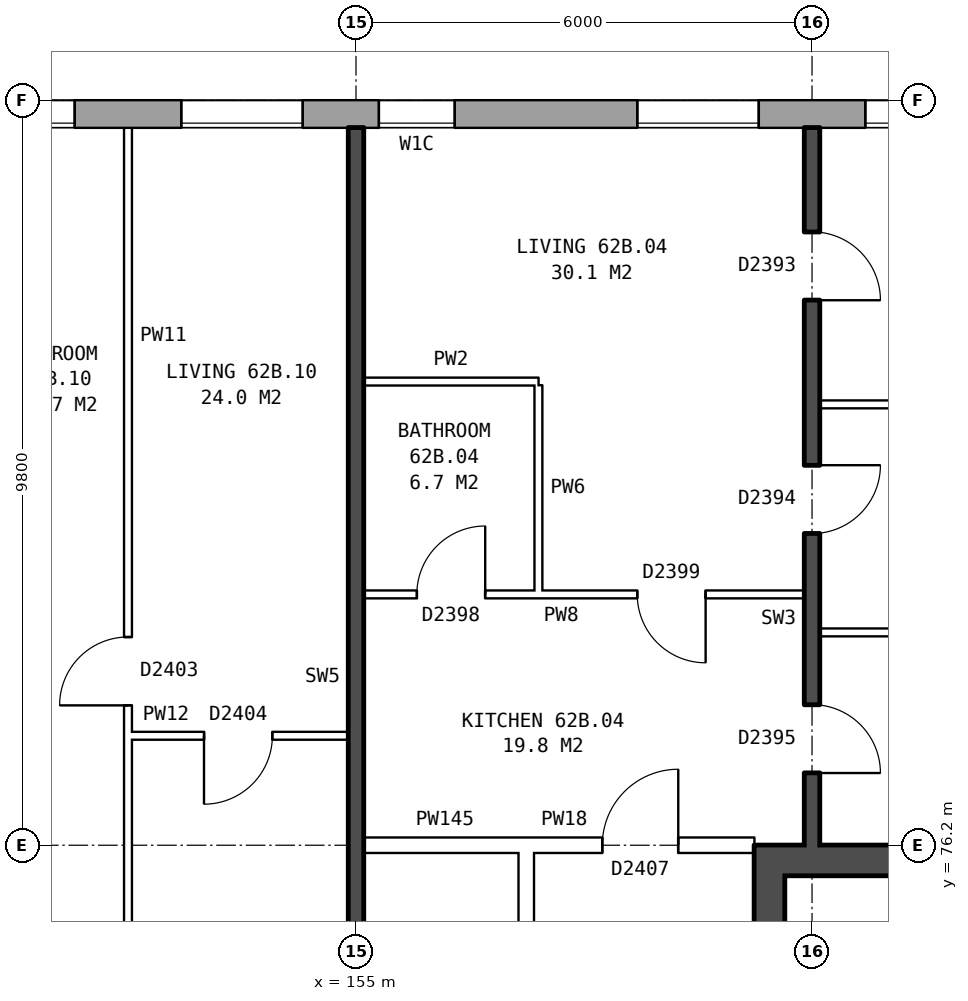
"""IFC4 building model, lengths in metres.
Left out: names, types, materials, properties, quantities, classifications, styles, units other than length and angle.
Written with IfcOpenShell. Run it as: python <this file> out.ifc"""

import sys

from ifc_helpers import new_model, si_unit, direction, frame, frame_2d, origin, place, context, subcontext, project, spatial, rectangle, extrude, element, fill, save


model = new_model("IFC4")
c1 = context("Model", 3, precision=1e-05, world=origin(), true_north=direction((0.0, 1.0)))
c2 = subcontext(c1, "Body", "Model", "MODEL_VIEW")
j1 = project(units=[si_unit("LENGTHUNIT", "METRE"), si_unit("PLANEANGLEUNIT", "RADIAN")], contexts=[c1])
p1 = place(None, origin())
s1 = spatial("IfcSite", under=j1, at=p1, CompositionType="ELEMENT")
p2 = place(p1, origin())
s2 = spatial("IfcBuilding", under=s1, at=p2, CompositionType="ELEMENT")
p3 = place(p2, frame((0.0, 0.0, 221.4)))
s3 = spatial("IfcBuildingStorey", under=s2, at=p3, CompositionType="ELEMENT", Elevation=221.4)
p4 = place(p3, frame((165.925, 85.82, 0.0), z_axis=(0.0, 0.0, 1.0), x_axis=(-1.0, 0.0, 0.0)))
e1 = element("IfcWall", 1, at=p4, inside=s3, PredefinedType="STANDARD", context=c2, shape_type="SweptSolid", body=[
    extrude(rectangle(XDim=33.875, YDim=0.36, at=frame_2d((16.938, 0.0))), origin(), (0.0, 0.0, 1.0), 2.85),
])
p5 = place(p4, frame((2.625, 0.0, 0.8)))
e2 = element("IfcOpeningElement", 2, at=p5, cuts=e1, PredefinedType="OPENING", context=c2, shape_type="SweptSolid", body=[
    extrude(rectangle(XDim=1.6, YDim=1.8, at=frame_2d((0.8, 0.9))), frame((0.0, 0.19, 0.0), z_axis=(0.0, -1.0, 0.0), x_axis=(1.0, 0.0, 0.0)), (0.0, 0.0, 1.0), 0.38),
])
p6 = place(p4, frame((5.625, 0.0, 0.8)))
e3 = element("IfcOpeningElement", 3, at=p6, cuts=e1, PredefinedType="OPENING", context=c2, shape_type="SweptSolid", body=[
    extrude(rectangle(XDim=1.6, YDim=1.8, at=frame_2d((0.8, 0.9))), frame((0.0, 0.19, 0.0), z_axis=(0.0, -1.0, 0.0), x_axis=(1.0, 0.0, 0.0)), (0.0, 0.0, 1.0), 0.38),
])
p7 = place(p4, frame((9.625, 0.0, 0.8)))
e4 = element("IfcOpeningElement", 4, at=p7, cuts=e1, PredefinedType="OPENING", context=c2, shape_type="SweptSolid", body=[
    extrude(rectangle(XDim=1.0, YDim=1.8, at=frame_2d((0.5, 0.9))), frame((0.0, 0.19, 0.0), z_axis=(0.0, -1.0, 0.0), x_axis=(1.0, 0.0, 0.0)), (0.0, 0.0, 1.0), 0.38),
])
p8 = place(p4, frame((11.625, 0.0, 0.8)))
e5 = element("IfcOpeningElement", 5, at=p8, cuts=e1, PredefinedType="OPENING", context=c2, shape_type="SweptSolid", body=[
    extrude(rectangle(XDim=1.6, YDim=1.8, at=frame_2d((0.8, 0.9))), frame((0.0, 0.19, 0.0), z_axis=(0.0, -1.0, 0.0), x_axis=(1.0, 0.0, 0.0)), (0.0, 0.0, 1.0), 0.38),
])
p9 = place(p4, frame((14.625, 0.0, 0.8)))
e6 = element("IfcOpeningElement", 6, at=p9, cuts=e1, PredefinedType="OPENING", context=c2, shape_type="SweptSolid", body=[
    extrude(rectangle(XDim=1.6, YDim=1.8, at=frame_2d((0.8, 0.9))), frame((0.0, 0.19, 0.0), z_axis=(0.0, -1.0, 0.0), x_axis=(1.0, 0.0, 0.0)), (0.0, 0.0, 1.0), 0.38),
])
p10 = place(p4, frame((17.625, 0.0, 0.8)))
e7 = element("IfcOpeningElement", 7, at=p10, cuts=e1, PredefinedType="OPENING", context=c2, shape_type="SweptSolid", body=[
    extrude(rectangle(XDim=1.6, YDim=1.8, at=frame_2d((0.8, 0.9))), frame((0.0, 0.19, 0.0), z_axis=(0.0, -1.0, 0.0), x_axis=(1.0, 0.0, 0.0)), (0.0, 0.0, 1.0), 0.38),
])
p11 = place(p4, frame((20.625, 0.0, 0.8)))
e8 = element("IfcOpeningElement", 8, at=p11, cuts=e1, PredefinedType="OPENING", context=c2, shape_type="SweptSolid", body=[
    extrude(rectangle(XDim=1.6, YDim=1.8, at=frame_2d((0.8, 0.9))), frame((0.0, 0.19, 0.0), z_axis=(0.0, -1.0, 0.0), x_axis=(1.0, 0.0, 0.0)), (0.0, 0.0, 1.0), 0.38),
])
p12 = place(p4, frame((23.825, 0.0, 1.7)))
e9 = element("IfcOpeningElement", 9, at=p12, cuts=e1, PredefinedType="OPENING", context=c2, shape_type="SweptSolid", body=[
    extrude(rectangle(XDim=0.6, YDim=0.9, at=frame_2d((0.3, 0.45))), frame((0.0, 0.19, 0.0), z_axis=(0.0, -1.0, 0.0), x_axis=(1.0, 0.0, 0.0)), (0.0, 0.0, 1.0), 0.38),
])
p13 = place(p4, frame((26.625, 0.0, 0.8)))
e10 = element("IfcOpeningElement", 10, at=p13, cuts=e1, PredefinedType="OPENING", context=c2, shape_type="SweptSolid", body=[
    extrude(rectangle(XDim=1.6, YDim=1.8, at=frame_2d((0.8, 0.9))), frame((0.0, 0.19, 0.0), z_axis=(0.0, -1.0, 0.0), x_axis=(1.0, 0.0, 0.0)), (0.0, 0.0, 1.0), 0.38),
])
p14 = place(p4, frame((29.625, 0.0, 0.8)))
e11 = element("IfcOpeningElement", 11, at=p14, cuts=e1, PredefinedType="OPENING", context=c2, shape_type="SweptSolid", body=[
    extrude(rectangle(XDim=1.6, YDim=1.8, at=frame_2d((0.8, 0.9))), frame((0.0, 0.19, 0.0), z_axis=(0.0, -1.0, 0.0), x_axis=(1.0, 0.0, 0.0)), (0.0, 0.0, 1.0), 0.38),
])
p15 = place(p4, frame((24.725, 0.0, 0.8)))
e12 = element("IfcOpeningElement", 12, at=p15, cuts=e1, PredefinedType="OPENING", context=c2, shape_type="SweptSolid", body=[
    extrude(rectangle(XDim=1.6, YDim=1.8, at=frame_2d((0.8, 0.9))), frame((0.0, 0.19, 0.0), z_axis=(0.0, -1.0, 0.0), x_axis=(1.0, 0.0, 0.0)), (0.0, 0.0, 1.0), 0.38),
])
p16 = place(p3, frame((160.44, 76.2, 0.0), z_axis=(0.0, 0.0, 1.0), x_axis=(0.0, -1.0, 0.0)))
e13 = element("IfcWall", 13, at=p16, inside=s3, PredefinedType="SHEAR", context=c2, shape_type="SweptSolid", body=[
    extrude(rectangle(XDim=12.4, YDim=0.4, at=frame_2d((6.2, 0.0))), origin(), (0.0, 0.0, 1.0), 2.85),
])
p17 = place(p16, frame((1.325, 0.0, 0.0)))
e14 = element("IfcOpeningElement", 14, at=p17, cuts=e13, PredefinedType="OPENING", context=c2, shape_type="SweptSolid", body=[
    extrude(rectangle(XDim=1.1, YDim=2.1, at=frame_2d((0.55, 1.05))), frame((0.0, 0.21, 0.0), z_axis=(0.0, -1.0, 0.0), x_axis=(1.0, 0.0, 0.0)), (0.0, 0.0, 1.0), 0.42),
])
p18 = place(p16, frame((3.625, 0.0, 0.0)))
e15 = element("IfcOpeningElement", 15, at=p18, cuts=e13, PredefinedType="OPENING", context=c2, shape_type="SweptSolid", body=[
    extrude(rectangle(XDim=0.85, YDim=2.1, at=frame_2d((0.425, 1.05))), frame((0.0, 0.21, 0.0), z_axis=(0.0, -1.0, 0.0), x_axis=(1.0, 0.0, 0.0)), (0.0, 0.0, 1.0), 0.42),
])
p19 = place(p16, frame((5.775, 0.0, 0.0)))
e16 = element("IfcOpeningElement", 16, at=p19, cuts=e13, PredefinedType="OPENING", context=c2, shape_type="SweptSolid", body=[
    extrude(rectangle(XDim=0.85, YDim=2.1, at=frame_2d((0.425, 1.05))), frame((0.0, 0.21, 0.0), z_axis=(0.0, -1.0, 0.0), x_axis=(1.0, 0.0, 0.0)), (0.0, 0.0, 1.0), 0.42),
])
p20 = place(p16, frame((9.9, 0.0, 0.0)))
e17 = element("IfcOpeningElement", 17, at=p20, cuts=e13, PredefinedType="OPENING", context=c2, shape_type="SweptSolid", body=[
    extrude(rectangle(XDim=1.1, YDim=2.1, at=frame_2d((0.55, 1.05))), frame((0.0, 0.21, 0.0), z_axis=(0.0, -1.0, 0.0), x_axis=(1.0, 0.0, 0.0)), (0.0, 0.0, 1.0), 0.42),
])
p21 = place(p16, frame((8.125, 0.0, 0.0)))
e18 = element("IfcOpeningElement", 18, at=p21, cuts=e13, PredefinedType="OPENING", context=c2, shape_type="SweptSolid", body=[
    extrude(rectangle(XDim=0.85, YDim=2.1, at=frame_2d((0.425, 1.05))), frame((0.0, 0.21, 0.0), z_axis=(0.0, -1.0, 0.0), x_axis=(1.0, 0.0, 0.0)), (0.0, 0.0, 1.0), 0.42),
])
p22 = place(p3, frame((160.64, 76.0, 0.0), z_axis=(0.0, 0.0, 1.0), x_axis=(1.0, 0.0, 0.0)))
e19 = element("IfcWall", 19, at=p22, inside=s3, PredefinedType="SHEAR", context=c2, shape_type="SweptSolid", body=[
    extrude(rectangle(XDim=7.6, YDim=0.4, at=frame_2d((3.8, 0.0))), origin(), (0.0, 0.0, 1.0), 2.85),
])
p23 = place(p3, frame((157.24, 63.9, 0.0), z_axis=(0.0, 0.0, 1.0), x_axis=(0.0, 1.0, 0.0)))
e20 = element("IfcWall", 20, at=p23, inside=s3, PredefinedType="PARTITIONING", context=c2, shape_type="SweptSolid", body=[
    extrude(rectangle(XDim=12.2, YDim=0.2, at=frame_2d((6.1, 0.0))), origin(), (0.0, 0.0, 1.0), 2.85),
])
p24 = place(p23, frame((5.1, 0.0, 0.0)))
e21 = element("IfcOpeningElement", 21, at=p24, cuts=e20, PredefinedType="OPENING", context=c2, shape_type="SweptSolid", body=[
    extrude(rectangle(XDim=2.0, YDim=2.1, at=frame_2d((1.0, 1.05))), frame((0.0, 0.11, 0.0), z_axis=(0.0, -1.0, 0.0), x_axis=(1.0, 0.0, 0.0)), (0.0, 0.0, 1.0), 0.22),
])
p25 = place(p3, frame((155.1, 76.2, 0.0), z_axis=(0.0, 0.0, 1.0), x_axis=(1.0, 0.0, 0.0)))
e22 = element("IfcWall", 22, at=p25, inside=s3, PredefinedType="PARTITIONING", context=c2, shape_type="SweptSolid", body=[
    extrude(rectangle(XDim=2.14, YDim=0.2, at=frame_2d((1.07, 0.0))), origin(), (0.0, 0.0, 1.0), 2.85),
])
p26 = place(p3, frame((157.24, 76.2, 0.0), z_axis=(0.0, 0.0, 1.0), x_axis=(1.0, 0.0, 0.0)))
e23 = element("IfcWall", 23, at=p26, inside=s3, PredefinedType="PARTITIONING", context=c2, shape_type="SweptSolid", body=[
    extrude(rectangle(XDim=3.0, YDim=0.2, at=frame_2d((1.5, 0.0))), origin(), (0.0, 0.0, 1.0), 2.85),
])
p27 = place(p26, frame((1.0, 0.0, 0.0)))
e24 = element("IfcOpeningElement", 24, at=p27, cuts=e23, PredefinedType="OPENING", context=c2, shape_type="SweptSolid", body=[
    extrude(rectangle(XDim=1.0, YDim=2.1, at=frame_2d((0.5, 1.05))), frame((0.0, 0.11, 0.0), z_axis=(0.0, -1.0, 0.0), x_axis=(1.0, 0.0, 0.0)), (0.0, 0.0, 1.0), 0.22),
])
p28 = place(p3, frame((152.0, 77.64, 0.0), z_axis=(0.0, 0.0, 1.0), x_axis=(1.0, 0.0, 0.0)))
e25 = element("IfcWall", 25, at=p28, inside=s3, PredefinedType="PARTITIONING", context=c2, shape_type="SweptSolid", body=[
    extrude(rectangle(XDim=2.9, YDim=0.1, at=frame_2d((1.45, 0.0))), origin(), (0.0, 0.0, 1.0), 2.85),
])
p29 = place(p28, frame((1.0, 0.0, 0.0)))
e26 = element("IfcOpeningElement", 26, at=p29, cuts=e25, PredefinedType="OPENING", context=c2, shape_type="SweptSolid", body=[
    extrude(rectangle(XDim=0.9, YDim=2.1, at=frame_2d((0.45, 1.05))), frame((0.0, 0.06, 0.0), z_axis=(0.0, -1.0, 0.0), x_axis=(1.0, 0.0, 0.0)), (0.0, 0.0, 1.0), 0.12),
])
p30 = place(p3, frame((161.1, 79.0, 0.0), z_axis=(0.0, 0.0, 1.0), x_axis=(1.0, 0.0, 0.0)))
e27 = element("IfcWall", 27, at=p30, inside=s3, PredefinedType="PARTITIONING", context=c2, shape_type="SweptSolid", body=[
    extrude(rectangle(XDim=7.54, YDim=0.1, at=frame_2d((3.77, 0.0))), origin(), (0.0, 0.0, 1.0), 2.85),
])
p31 = place(p3, frame((155.1, 79.5, 0.0), z_axis=(0.0, 0.0, 1.0), x_axis=(1.0, 0.0, 0.0)))
e28 = element("IfcWall", 28, at=p31, inside=s3, PredefinedType="PARTITIONING", context=c2, shape_type="SweptSolid", body=[
    extrude(rectangle(XDim=5.8, YDim=0.1, at=frame_2d((2.9, 0.0))), origin(), (0.0, 0.0, 1.0), 2.85),
])
p32 = place(p31, frame((3.6, 0.0, 0.0)))
e29 = element("IfcOpeningElement", 29, at=p32, cuts=e28, PredefinedType="OPENING", context=c2, shape_type="SweptSolid", body=[
    extrude(rectangle(XDim=0.9, YDim=2.1, at=frame_2d((0.45, 1.05))), frame((0.0, 0.06, 0.0), z_axis=(0.0, -1.0, 0.0), x_axis=(1.0, 0.0, 0.0)), (0.0, 0.0, 1.0), 0.12),
])
p33 = place(p31, frame((0.7, 0.0, 0.0)))
e30 = element("IfcOpeningElement", 30, at=p33, cuts=e28, PredefinedType="OPENING", context=c2, shape_type="SweptSolid", body=[
    extrude(rectangle(XDim=0.9, YDim=2.1, at=frame_2d((0.45, 1.05))), frame((0.0, 0.06, 0.0), z_axis=(0.0, -1.0, 0.0), x_axis=(1.0, 0.0, 0.0)), (0.0, 0.0, 1.0), 0.12),
])
p34 = place(p3, frame((161.1, 82.0, 0.0), z_axis=(0.0, 0.0, 1.0), x_axis=(1.0, 0.0, 0.0)))
e31 = element("IfcWall", 31, at=p34, inside=s3, PredefinedType="PARTITIONING", context=c2, shape_type="SweptSolid", body=[
    extrude(rectangle(XDim=7.54, YDim=0.1, at=frame_2d((3.77, 0.0))), origin(), (0.0, 0.0, 1.0), 2.85),
])
p35 = place(p3, frame((155.1, 82.3, 0.0), z_axis=(0.0, 0.0, 1.0), x_axis=(1.0, 0.0, 0.0)))
e32 = element("IfcWall", 32, at=p35, inside=s3, PredefinedType="PARTITIONING", context=c2, shape_type="SweptSolid", body=[
    extrude(rectangle(XDim=2.3, YDim=0.1, at=frame_2d((1.15, 0.0))), origin(), (0.0, 0.0, 1.0), 2.85),
])
p36 = place(p3, frame((152.0, 71.3, 0.0), z_axis=(0.0, 0.0, 1.0), x_axis=(0.0, 1.0, 0.0)))
e33 = element("IfcWall", 33, at=p36, inside=s3, PredefinedType="PARTITIONING", context=c2, shape_type="SweptSolid", body=[
    extrude(rectangle(XDim=14.34, YDim=0.1, at=frame_2d((7.17, 0.0))), origin(), (0.0, 0.0, 1.0), 2.85),
])
p37 = place(p36, frame((6.74, 0.0, 0.0)))
e34 = element("IfcOpeningElement", 34, at=p37, cuts=e33, PredefinedType="OPENING", context=c2, shape_type="SweptSolid", body=[
    extrude(rectangle(XDim=0.9, YDim=2.1, at=frame_2d((0.45, 1.05))), frame((0.0, 0.06, 0.0), z_axis=(0.0, -1.0, 0.0), x_axis=(1.0, 0.0, 0.0)), (0.0, 0.0, 1.0), 0.12),
])
p38 = place(p36, frame((0.4, 0.0, 0.0)))
e35 = element("IfcOpeningElement", 35, at=p38, cuts=e33, PredefinedType="OPENING", context=c2, shape_type="SweptSolid", body=[
    extrude(rectangle(XDim=0.9, YDim=2.1, at=frame_2d((0.45, 1.05))), frame((0.0, 0.06, 0.0), z_axis=(0.0, -1.0, 0.0), x_axis=(1.0, 0.0, 0.0)), (0.0, 0.0, 1.0), 0.12),
])
p39 = place(p3, frame((155.0, 71.2, 0.0), z_axis=(0.0, 0.0, 1.0), x_axis=(0.0, 1.0, 0.0)))
e36 = element("IfcWall", 36, at=p39, inside=s3, PredefinedType="SOLIDWALL", context=c2, shape_type="SweptSolid", body=[
    extrude(rectangle(XDim=14.44, YDim=0.2, at=frame_2d((7.22, 0.0))), origin(), (0.0, 0.0, 1.0), 2.85),
])
p40 = place(p3, frame((157.4, 79.55, 0.0), z_axis=(0.0, 0.0, 1.0), x_axis=(0.0, 1.0, 0.0)))
e37 = element("IfcWall", 37, at=p40, inside=s3, PredefinedType="PARTITIONING", context=c2, shape_type="SweptSolid", body=[
    extrude(rectangle(XDim=2.7, YDim=0.1, at=frame_2d((1.35, 0.0))), origin(), (0.0, 0.0, 1.0), 2.85),
])
p41 = place(p3, frame((161.0, 76.2, 0.0), z_axis=(0.0, 0.0, 1.0), x_axis=(0.0, 1.0, 0.0)))
e38 = element("IfcWall", 38, at=p41, inside=s3, PredefinedType="SOLIDWALL", context=c2, shape_type="SweptSolid", body=[
    extrude(rectangle(XDim=9.44, YDim=0.2, at=frame_2d((4.72, 0.0))), origin(), (0.0, 0.0, 1.0), 2.85),
])
p42 = place(p41, frame((7.17, 0.0, 0.0)))
e39 = element("IfcOpeningElement", 39, at=p42, cuts=e38, PredefinedType="OPENING", context=c2, shape_type="SweptSolid", body=[
    extrude(rectangle(XDim=0.9, YDim=2.1, at=frame_2d((0.45, 1.05))), frame((0.0, 0.11, 0.0), z_axis=(0.0, -1.0, 0.0), x_axis=(1.0, 0.0, 0.0)), (0.0, 0.0, 1.0), 0.22),
])
p43 = place(p41, frame((4.1, 0.0, 0.0)))
e40 = element("IfcOpeningElement", 40, at=p43, cuts=e38, PredefinedType="OPENING", context=c2, shape_type="SweptSolid", body=[
    extrude(rectangle(XDim=0.9, YDim=2.1, at=frame_2d((0.45, 1.05))), frame((0.0, 0.11, 0.0), z_axis=(0.0, -1.0, 0.0), x_axis=(1.0, 0.0, 0.0)), (0.0, 0.0, 1.0), 0.22),
])
p44 = place(p41, frame((0.95, 0.0, 0.0)))
e41 = element("IfcOpeningElement", 41, at=p44, cuts=e38, PredefinedType="OPENING", context=c2, shape_type="SweptSolid", body=[
    extrude(rectangle(XDim=0.9, YDim=2.1, at=frame_2d((0.45, 1.05))), frame((0.0, 0.11, 0.0), z_axis=(0.0, -1.0, 0.0), x_axis=(1.0, 0.0, 0.0)), (0.0, 0.0, 1.0), 0.22),
])
p45 = place(p5, origin())
e42 = element("IfcWindow", 42, at=p45, inside=s3, PartitioningType="SINGLE_PANEL", PredefinedType="WINDOW", context=c2, shape_type="SweptSolid", body=[
    extrude(rectangle(XDim=1.6, YDim=1.8, at=frame_2d((0.8, 0.9))), frame((0.0, 0.15, 0.0), z_axis=(0.0, -1.0, 0.0), x_axis=(1.0, 0.0, 0.0)), (0.0, 0.0, 1.0), 0.06),
])
fill(e2, e42)
p46 = place(p6, origin())
e43 = element("IfcWindow", 43, at=p46, inside=s3, PartitioningType="SINGLE_PANEL", PredefinedType="WINDOW", context=c2, shape_type="SweptSolid", body=[
    extrude(rectangle(XDim=1.6, YDim=1.8, at=frame_2d((0.8, 0.9))), frame((0.0, 0.15, 0.0), z_axis=(0.0, -1.0, 0.0), x_axis=(1.0, 0.0, 0.0)), (0.0, 0.0, 1.0), 0.06),
])
fill(e3, e43)
p47 = place(p7, origin())
e44 = element("IfcWindow", 44, at=p47, inside=s3, PartitioningType="SINGLE_PANEL", PredefinedType="WINDOW", context=c2, shape_type="SweptSolid", body=[
    extrude(rectangle(XDim=1.0, YDim=1.8, at=frame_2d((0.5, 0.9))), frame((0.0, 0.15, 0.0), z_axis=(0.0, -1.0, 0.0), x_axis=(1.0, 0.0, 0.0)), (0.0, 0.0, 1.0), 0.06),
])
fill(e4, e44)
p48 = place(p8, origin())
e45 = element("IfcWindow", 45, at=p48, inside=s3, PartitioningType="SINGLE_PANEL", PredefinedType="WINDOW", context=c2, shape_type="SweptSolid", body=[
    extrude(rectangle(XDim=1.6, YDim=1.8, at=frame_2d((0.8, 0.9))), frame((0.0, 0.15, 0.0), z_axis=(0.0, -1.0, 0.0), x_axis=(1.0, 0.0, 0.0)), (0.0, 0.0, 1.0), 0.06),
])
fill(e5, e45)
p49 = place(p9, origin())
e46 = element("IfcWindow", 46, at=p49, inside=s3, PartitioningType="SINGLE_PANEL", PredefinedType="WINDOW", context=c2, shape_type="SweptSolid", body=[
    extrude(rectangle(XDim=1.6, YDim=1.8, at=frame_2d((0.8, 0.9))), frame((0.0, 0.15, 0.0), z_axis=(0.0, -1.0, 0.0), x_axis=(1.0, 0.0, 0.0)), (0.0, 0.0, 1.0), 0.06),
])
fill(e6, e46)
p50 = place(p42, frame((0.9, 0.0, 0.0), z_axis=(0.0, 0.0, 1.0), x_axis=(-1.0, 0.0, 0.0)))
e47 = element("IfcDoor", 47, at=p50, inside=s3, OperationType="SINGLE_SWING_RIGHT", PredefinedType="DOOR", context=c2, shape_type="SweptSolid", body=[
    extrude(rectangle(XDim=0.9, YDim=2.1, at=frame_2d((0.45, 1.05))), frame((0.0, 0.025, 0.0), z_axis=(0.0, -1.0, 0.0), x_axis=(1.0, 0.0, 0.0)), (0.0, 0.0, 1.0), 0.05),
])
fill(e39, e47)
p51 = place(p43, frame((0.9, 0.0, 0.0), z_axis=(0.0, 0.0, 1.0), x_axis=(-1.0, 0.0, 0.0)))
e48 = element("IfcDoor", 48, at=p51, inside=s3, OperationType="SINGLE_SWING_LEFT", PredefinedType="DOOR", context=c2, shape_type="SweptSolid", body=[
    extrude(rectangle(XDim=0.9, YDim=2.1, at=frame_2d((0.45, 1.05))), frame((0.0, 0.025, 0.0), z_axis=(0.0, -1.0, 0.0), x_axis=(1.0, 0.0, 0.0)), (0.0, 0.0, 1.0), 0.05),
])
fill(e40, e48)
p52 = place(p44, frame((0.9, 0.0, 0.0), z_axis=(0.0, 0.0, 1.0), x_axis=(-1.0, 0.0, 0.0)))
e49 = element("IfcDoor", 49, at=p52, inside=s3, OperationType="SINGLE_SWING_RIGHT", PredefinedType="DOOR", context=c2, shape_type="SweptSolid", body=[
    extrude(rectangle(XDim=0.9, YDim=2.1, at=frame_2d((0.45, 1.05))), frame((0.0, 0.025, 0.0), z_axis=(0.0, -1.0, 0.0), x_axis=(1.0, 0.0, 0.0)), (0.0, 0.0, 1.0), 0.05),
])
fill(e41, e49)
p53 = place(p27, origin())
e50 = element("IfcDoor", 50, at=p53, inside=s3, OperationType="SINGLE_SWING_RIGHT", PredefinedType="DOOR", context=c2, shape_type="SweptSolid", body=[
    extrude(rectangle(XDim=1.0, YDim=2.1, at=frame_2d((0.5, 1.05))), frame((0.0, 0.025, 0.0), z_axis=(0.0, -1.0, 0.0), x_axis=(1.0, 0.0, 0.0)), (0.0, 0.0, 1.0), 0.05),
])
fill(e24, e50)
p54 = place(p32, frame((0.9, 0.0, 0.0), z_axis=(0.0, 0.0, 1.0), x_axis=(-1.0, 0.0, 0.0)))
e51 = element("IfcDoor", 51, at=p54, inside=s3, OperationType="SINGLE_SWING_LEFT", PredefinedType="DOOR", context=c2, shape_type="SweptSolid", body=[
    extrude(rectangle(XDim=0.9, YDim=2.1, at=frame_2d((0.45, 1.05))), frame((0.0, 0.025, 0.0), z_axis=(0.0, -1.0, 0.0), x_axis=(1.0, 0.0, 0.0)), (0.0, 0.0, 1.0), 0.05),
])
fill(e29, e51)
p55 = place(p33, origin())
e52 = element("IfcDoor", 52, at=p55, inside=s3, OperationType="SINGLE_SWING_RIGHT", PredefinedType="DOOR", context=c2, shape_type="SweptSolid", body=[
    extrude(rectangle(XDim=0.9, YDim=2.1, at=frame_2d((0.45, 1.05))), frame((0.0, 0.025, 0.0), z_axis=(0.0, -1.0, 0.0), x_axis=(1.0, 0.0, 0.0)), (0.0, 0.0, 1.0), 0.05),
])
fill(e30, e52)
p56 = place(p37, origin())
e53 = element("IfcDoor", 53, at=p56, inside=s3, OperationType="SINGLE_SWING_LEFT", PredefinedType="DOOR", context=c2, shape_type="SweptSolid", body=[
    extrude(rectangle(XDim=0.9, YDim=2.1, at=frame_2d((0.45, 1.05))), frame((0.0, 0.025, 0.0), z_axis=(0.0, -1.0, 0.0), x_axis=(1.0, 0.0, 0.0)), (0.0, 0.0, 1.0), 0.05),
])
fill(e34, e53)
p57 = place(p29, frame((0.9, 0.0, 0.0), z_axis=(0.0, 0.0, 1.0), x_axis=(-1.0, 0.0, 0.0)))
e54 = element("IfcDoor", 54, at=p57, inside=s3, OperationType="SINGLE_SWING_RIGHT", PredefinedType="DOOR", context=c2, shape_type="SweptSolid", body=[
    extrude(rectangle(XDim=0.9, YDim=2.1, at=frame_2d((0.45, 1.05))), frame((0.0, 0.025, 0.0), z_axis=(0.0, -1.0, 0.0), x_axis=(1.0, 0.0, 0.0)), (0.0, 0.0, 1.0), 0.05),
])
fill(e26, e54)
save(model, sys.argv[1])
